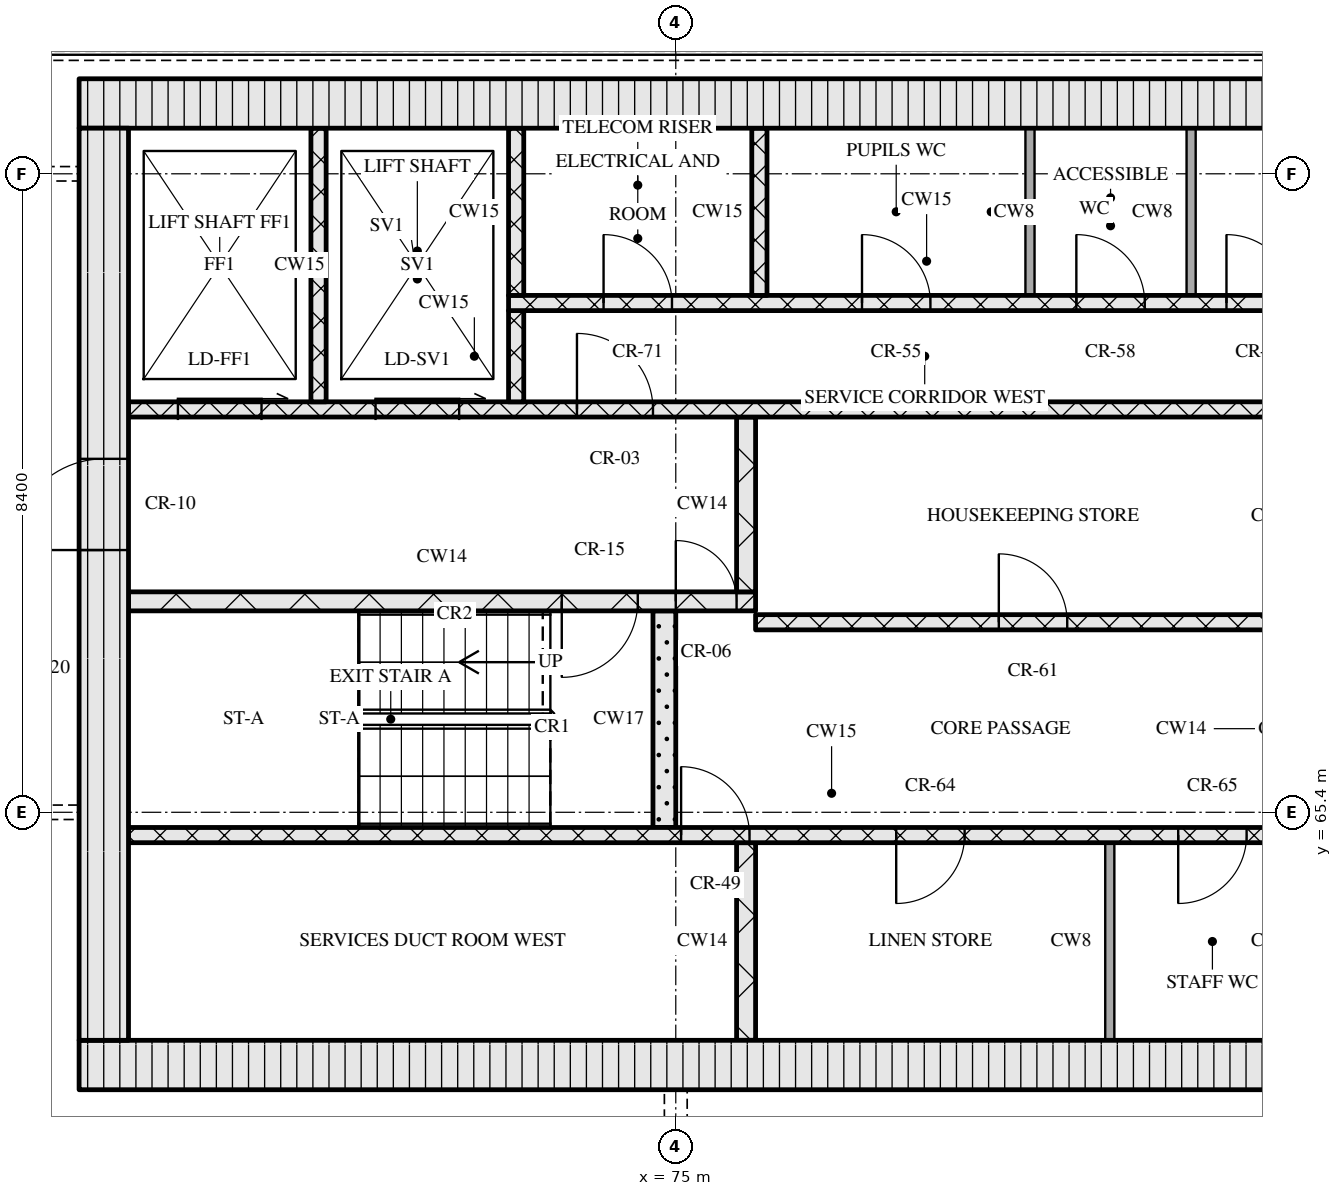
"""IFC4 building model, lengths in metres.
Left out: names, types, materials, properties, quantities, classifications, styles, units other than length and angle.
Written with IfcOpenShell. Run it as: python <this file> out.ifc"""

import sys

from ifc_helpers import new_model, si_unit, direction, frame, frame_2d, origin, place, context, subcontext, project, spatial, rectangle, extrude, element, fill, save


model = new_model("IFC4")
c1 = context("Model", 3, precision=1e-05, world=origin(), true_north=direction((0.0, 1.0)))
c2 = subcontext(c1, "Body", "Model", "MODEL_VIEW")
j1 = project(units=[si_unit("LENGTHUNIT", "METRE"), si_unit("PLANEANGLEUNIT", "RADIAN")], contexts=[c1])
p1 = place(None, origin())
s1 = spatial("IfcSite", under=j1, at=p1, CompositionType="ELEMENT")
p2 = place(p1, origin())
s2 = spatial("IfcBuilding", under=s1, at=p2, CompositionType="ELEMENT")
p3 = place(p2, frame((0.0, 0.0, 219.9)))
s3 = spatial("IfcBuildingStorey", under=s2, at=p3, CompositionType="ELEMENT", Elevation=219.9)
p4 = place(p3, frame((67.15, 62.075, 0.0), z_axis=(0.0, 0.0, 1.0), x_axis=(1.0, 0.0, 0.0)))
e1 = element("IfcWall", 1, at=p4, inside=s3, PredefinedType="SOLIDWALL", context=c2, shape_type="SweptSolid", body=[
    extrude(rectangle(XDim=40.9, YDim=0.65, at=frame_2d((20.45, 0.0))), origin(), (0.0, 0.0, 1.0), 3.32),
])
p5 = place(p4, frame((20.8, 0.0, 0.0)))
e2 = element("IfcOpeningElement", 2, at=p5, cuts=e1, PredefinedType="OPENING", context=c2, shape_type="SweptSolid", body=[
    extrude(rectangle(XDim=1.8, YDim=2.1, at=frame_2d((0.9, 1.05))), frame((0.0, 0.335, 0.0), z_axis=(0.0, -1.0, 0.0), x_axis=(1.0, 0.0, 0.0)), (0.0, 0.0, 1.0), 0.67),
])
p6 = place(p3, frame((67.15, 74.725, 0.0), z_axis=(0.0, 0.0, 1.0), x_axis=(1.0, 0.0, 0.0)))
e3 = element("IfcWall", 3, at=p6, inside=s3, PredefinedType="SOLIDWALL", context=c2, shape_type="SweptSolid", body=[
    extrude(rectangle(XDim=40.9, YDim=0.65, at=frame_2d((20.45, 0.0))), origin(), (0.0, 0.0, 1.0), 3.32),
])
p7 = place(p3, frame((67.475, 62.4, 0.0), z_axis=(0.0, 0.0, 1.0), x_axis=(0.0, 1.0, 0.0)))
e4 = element("IfcWall", 4, at=p7, inside=s3, PredefinedType="SOLIDWALL", context=c2, shape_type="SweptSolid", body=[
    extrude(rectangle(XDim=12.0, YDim=0.65, at=frame_2d((6.0, 0.0))), origin(), (0.0, 0.0, 1.0), 3.32),
])
p8 = place(p7, frame((6.45, 0.0, 0.0)))
e5 = element("IfcOpeningElement", 5, at=p8, cuts=e4, PredefinedType="OPENING", context=c2, shape_type="SweptSolid", body=[
    extrude(rectangle(XDim=1.2, YDim=2.1, at=frame_2d((0.6, 1.05))), frame((0.0, 0.335, 0.0), z_axis=(0.0, -1.0, 0.0), x_axis=(1.0, 0.0, 0.0)), (0.0, 0.0, 1.0), 0.67),
])
p9 = place(p3, frame((75.925, 62.4, 0.0), z_axis=(0.0, 0.0, 1.0), x_axis=(0.0, 1.0, 0.0)))
e6 = element("IfcWall", 6, at=p9, inside=s3, PredefinedType="SOLIDWALL", context=c2, shape_type="SweptSolid", body=[
    extrude(rectangle(XDim=2.6, YDim=0.25, at=frame_2d((1.3, 0.0))), origin(), (0.0, 0.0, 1.0), 3.32),
])
p10 = place(p3, frame((80.71, 62.4, 0.0), z_axis=(0.0, 0.0, 1.0), x_axis=(0.0, 1.0, 0.0)))
e7 = element("IfcWall", 7, at=p10, inside=s3, PredefinedType="PARTITIONING", context=c2, shape_type="SweptSolid", body=[
    extrude(rectangle(XDim=2.6, YDim=0.12, at=frame_2d((1.3, 0.0))), origin(), (0.0, 0.0, 1.0), 3.32),
])
p11 = place(p3, frame((67.8, 65.1, 0.0), z_axis=(0.0, 0.0, 1.0), x_axis=(1.0, 0.0, 0.0)))
e8 = element("IfcWall", 8, at=p11, inside=s3, PredefinedType="SOLIDWALL", context=c2, shape_type="SweptSolid", body=[
    extrude(rectangle(XDim=18.5, YDim=0.2, at=frame_2d((9.25, 0.0))), origin(), (0.0, 0.0, 1.0), 3.32),
])
p12 = place(p11, frame((7.27, 0.0, 0.0)))
e9 = element("IfcOpeningElement", 9, at=p12, cuts=e8, PredefinedType="OPENING", context=c2, shape_type="SweptSolid", body=[
    extrude(rectangle(XDim=0.9, YDim=2.1, at=frame_2d((0.45, 1.05))), frame((0.0, 0.11, 0.0), z_axis=(0.0, -1.0, 0.0), x_axis=(1.0, 0.0, 0.0)), (0.0, 0.0, 1.0), 0.22),
])
p13 = place(p11, frame((10.1, 0.0, 0.0)))
e10 = element("IfcOpeningElement", 10, at=p13, cuts=e8, PredefinedType="OPENING", context=c2, shape_type="SweptSolid", body=[
    extrude(rectangle(XDim=0.9, YDim=2.1, at=frame_2d((0.45, 1.05))), frame((0.0, 0.11, 0.0), z_axis=(0.0, -1.0, 0.0), x_axis=(1.0, 0.0, 0.0)), (0.0, 0.0, 1.0), 0.22),
])
p14 = place(p11, frame((13.81, 0.0, 0.0)))
e11 = element("IfcOpeningElement", 11, at=p14, cuts=e8, PredefinedType="OPENING", context=c2, shape_type="SweptSolid", body=[
    extrude(rectangle(XDim=0.9, YDim=2.1, at=frame_2d((0.45, 1.05))), frame((0.0, 0.11, 0.0), z_axis=(0.0, -1.0, 0.0), x_axis=(1.0, 0.0, 0.0)), (0.0, 0.0, 1.0), 0.22),
])
p15 = place(p11, frame((16.7, 0.0, 0.0)))
e12 = element("IfcOpeningElement", 12, at=p15, cuts=e8, PredefinedType="OPENING", context=c2, shape_type="SweptSolid", body=[
    extrude(rectangle(XDim=0.9, YDim=2.1, at=frame_2d((0.45, 1.05))), frame((0.0, 0.11, 0.0), z_axis=(0.0, -1.0, 0.0), x_axis=(1.0, 0.0, 0.0)), (0.0, 0.0, 1.0), 0.22),
])
p16 = place(p3, frame((74.85, 65.2, 0.0), z_axis=(0.0, 0.0, 1.0), x_axis=(0.0, 1.0, 0.0)))
e13 = element("IfcWall", 13, at=p16, inside=s3, PredefinedType="SOLIDWALL", context=c2, shape_type="SweptSolid", body=[
    extrude(rectangle(XDim=2.85, YDim=0.3, at=frame_2d((1.425, 0.0))), origin(), (0.0, 0.0, 1.0), 3.32),
])
p17 = place(p3, frame((76.05, 67.9, 0.0), z_axis=(0.0, 0.0, 1.0), x_axis=(1.0, 0.0, 0.0)))
e14 = element("IfcWall", 14, at=p17, inside=s3, PredefinedType="SOLIDWALL", context=c2, shape_type="SweptSolid", body=[
    extrude(rectangle(XDim=23.1, YDim=0.2, at=frame_2d((11.55, 0.0))), origin(), (0.0, 0.0, 1.0), 3.32),
])
p18 = place(p17, frame((3.2, 0.0, 0.0)))
e15 = element("IfcOpeningElement", 15, at=p18, cuts=e14, PredefinedType="OPENING", context=c2, shape_type="SweptSolid", body=[
    extrude(rectangle(XDim=0.9, YDim=2.1, at=frame_2d((0.45, 1.05))), frame((0.0, 0.11, 0.0), z_axis=(0.0, -1.0, 0.0), x_axis=(1.0, 0.0, 0.0)), (0.0, 0.0, 1.0), 0.22),
])
p19 = place(p17, frame((9.7, 0.0, 0.0)))
e16 = element("IfcOpeningElement", 16, at=p19, cuts=e14, PredefinedType="OPENING", context=c2, shape_type="SweptSolid", body=[
    extrude(rectangle(XDim=0.9, YDim=2.1, at=frame_2d((0.45, 1.05))), frame((0.0, 0.11, 0.0), z_axis=(0.0, -1.0, 0.0), x_axis=(1.0, 0.0, 0.0)), (0.0, 0.0, 1.0), 0.22),
])
p20 = place(p17, frame((13.55, 0.0, 0.0)))
e17 = element("IfcOpeningElement", 17, at=p20, cuts=e14, PredefinedType="OPENING", context=c2, shape_type="SweptSolid", body=[
    extrude(rectangle(XDim=1.0, YDim=2.1, at=frame_2d((0.5, 1.05))), frame((0.0, 0.11, 0.0), z_axis=(0.0, -1.0, 0.0), x_axis=(1.0, 0.0, 0.0)), (0.0, 0.0, 1.0), 0.22),
])
p21 = place(p17, frame((16.2, 0.0, 0.0)))
e18 = element("IfcOpeningElement", 18, at=p21, cuts=e14, PredefinedType="OPENING", context=c2, shape_type="SweptSolid", body=[
    extrude(rectangle(XDim=1.1, YDim=2.1, at=frame_2d((0.55, 1.05))), frame((0.0, 0.11, 0.0), z_axis=(0.0, -1.0, 0.0), x_axis=(1.0, 0.0, 0.0)), (0.0, 0.0, 1.0), 0.22),
])
p22 = place(p17, frame((18.7, 0.0, 0.0)))
e19 = element("IfcOpeningElement", 19, at=p22, cuts=e14, PredefinedType="OPENING", context=c2, shape_type="SweptSolid", body=[
    extrude(rectangle(XDim=1.1, YDim=2.1, at=frame_2d((0.55, 1.05))), frame((0.0, 0.11, 0.0), z_axis=(0.0, -1.0, 0.0), x_axis=(1.0, 0.0, 0.0)), (0.0, 0.0, 1.0), 0.22),
])
p23 = place(p17, frame((21.2, 0.0, 0.0)))
e20 = element("IfcOpeningElement", 20, at=p23, cuts=e14, PredefinedType="OPENING", context=c2, shape_type="SweptSolid", body=[
    extrude(rectangle(XDim=1.1, YDim=2.1, at=frame_2d((0.55, 1.05))), frame((0.0, 0.11, 0.0), z_axis=(0.0, -1.0, 0.0), x_axis=(1.0, 0.0, 0.0)), (0.0, 0.0, 1.0), 0.22),
])
p24 = place(p3, frame((67.8, 68.175, 0.0), z_axis=(0.0, 0.0, 1.0), x_axis=(1.0, 0.0, 0.0)))
e21 = element("IfcWall", 21, at=p24, inside=s3, PredefinedType="SOLIDWALL", context=c2, shape_type="SweptSolid", body=[
    extrude(rectangle(XDim=8.25, YDim=0.25, at=frame_2d((4.125, 0.0))), origin(), (0.0, 0.0, 1.0), 3.32),
])
p25 = place(p24, frame((5.7, 0.0, 0.0)))
e22 = element("IfcOpeningElement", 22, at=p25, cuts=e21, PredefinedType="OPENING", context=c2, shape_type="SweptSolid", body=[
    extrude(rectangle(XDim=1.0, YDim=2.1, at=frame_2d((0.5, 1.05))), frame((0.0, 0.135, 0.0), z_axis=(0.0, -1.0, 0.0), x_axis=(1.0, 0.0, 0.0)), (0.0, 0.0, 1.0), 0.27),
])
p26 = place(p24, frame((7.2, 0.0, 0.0)))
e23 = element("IfcOpeningElement", 23, at=p26, cuts=e21, PredefinedType="OPENING", context=c2, shape_type="SweptSolid", body=[
    extrude(rectangle(XDim=0.8, YDim=2.1, at=frame_2d((0.4, 1.05))), frame((0.0, 0.135, 0.0), z_axis=(0.0, -1.0, 0.0), x_axis=(1.0, 0.0, 0.0)), (0.0, 0.0, 1.0), 0.27),
])
p27 = place(p3, frame((75.925, 68.3, 0.0), z_axis=(0.0, 0.0, 1.0), x_axis=(0.0, 1.0, 0.0)))
e24 = element("IfcWall", 24, at=p27, inside=s3, PredefinedType="SOLIDWALL", context=c2, shape_type="SweptSolid", body=[
    extrude(rectangle(XDim=2.3, YDim=0.25, at=frame_2d((1.15, 0.0))), origin(), (0.0, 0.0, 1.0), 3.32),
])
p28 = place(p3, frame((67.8, 70.7, 0.0), z_axis=(0.0, 0.0, 1.0), x_axis=(1.0, 0.0, 0.0)))
e25 = element("IfcWall", 25, at=p28, inside=s3, PredefinedType="SOLIDWALL", context=c2, shape_type="SweptSolid", body=[
    extrude(rectangle(XDim=39.6, YDim=0.2, at=frame_2d((19.8, 0.0))), origin(), (0.0, 0.0, 1.0), 3.32),
])
p29 = place(p28, frame((0.65, 0.0, 0.0)))
e26 = element("IfcOpeningElement", 26, at=p29, cuts=e25, PredefinedType="OPENING", context=c2, shape_type="SweptSolid", body=[
    extrude(rectangle(XDim=1.1, YDim=2.1, at=frame_2d((0.55, 1.05))), frame((0.0, 0.11, 0.0), z_axis=(0.0, -1.0, 0.0), x_axis=(1.0, 0.0, 0.0)), (0.0, 0.0, 1.0), 0.22),
])
p30 = place(p28, frame((3.25, 0.0, 0.0)))
e27 = element("IfcOpeningElement", 27, at=p30, cuts=e25, PredefinedType="OPENING", context=c2, shape_type="SweptSolid", body=[
    extrude(rectangle(XDim=1.1, YDim=2.1, at=frame_2d((0.55, 1.05))), frame((0.0, 0.11, 0.0), z_axis=(0.0, -1.0, 0.0), x_axis=(1.0, 0.0, 0.0)), (0.0, 0.0, 1.0), 0.22),
])
p31 = place(p28, frame((5.9, 0.0, 0.0)))
e28 = element("IfcOpeningElement", 28, at=p31, cuts=e25, PredefinedType="OPENING", context=c2, shape_type="SweptSolid", body=[
    extrude(rectangle(XDim=1.0, YDim=2.1, at=frame_2d((0.5, 1.05))), frame((0.0, 0.11, 0.0), z_axis=(0.0, -1.0, 0.0), x_axis=(1.0, 0.0, 0.0)), (0.0, 0.0, 1.0), 0.22),
])
p32 = place(p28, frame((21.7, 0.0, 0.0)))
e29 = element("IfcOpeningElement", 29, at=p32, cuts=e25, PredefinedType="OPENING", context=c2, shape_type="SweptSolid", body=[
    extrude(rectangle(XDim=1.0, YDim=2.1, at=frame_2d((0.5, 1.05))), frame((0.0, 0.11, 0.0), z_axis=(0.0, -1.0, 0.0), x_axis=(1.0, 0.0, 0.0)), (0.0, 0.0, 1.0), 0.22),
])
p33 = place(p28, frame((32.7, 0.0, 0.0)))
e30 = element("IfcOpeningElement", 30, at=p33, cuts=e25, PredefinedType="OPENING", context=c2, shape_type="SweptSolid", body=[
    extrude(rectangle(XDim=1.0, YDim=2.1, at=frame_2d((0.5, 1.05))), frame((0.0, 0.11, 0.0), z_axis=(0.0, -1.0, 0.0), x_axis=(1.0, 0.0, 0.0)), (0.0, 0.0, 1.0), 0.22),
])
p34 = place(p28, frame((35.25, 0.0, 0.0)))
e31 = element("IfcOpeningElement", 31, at=p34, cuts=e25, PredefinedType="OPENING", context=c2, shape_type="SweptSolid", body=[
    extrude(rectangle(XDim=1.1, YDim=2.1, at=frame_2d((0.55, 1.05))), frame((0.0, 0.11, 0.0), z_axis=(0.0, -1.0, 0.0), x_axis=(1.0, 0.0, 0.0)), (0.0, 0.0, 1.0), 0.22),
])
p35 = place(p28, frame((37.85, 0.0, 0.0)))
e32 = element("IfcOpeningElement", 32, at=p35, cuts=e25, PredefinedType="OPENING", context=c2, shape_type="SweptSolid", body=[
    extrude(rectangle(XDim=1.1, YDim=2.1, at=frame_2d((0.55, 1.05))), frame((0.0, 0.11, 0.0), z_axis=(0.0, -1.0, 0.0), x_axis=(1.0, 0.0, 0.0)), (0.0, 0.0, 1.0), 0.22),
])
p36 = place(p3, frame((70.3, 70.8, 0.0), z_axis=(0.0, 0.0, 1.0), x_axis=(0.0, 1.0, 0.0)))
e33 = element("IfcWall", 33, at=p36, inside=s3, PredefinedType="SOLIDWALL", context=c2, shape_type="SweptSolid", body=[
    extrude(rectangle(XDim=3.6, YDim=0.2, at=frame_2d((1.8, 0.0))), origin(), (0.0, 0.0, 1.0), 3.32),
])
p37 = place(p3, frame((72.9, 70.8, 0.0), z_axis=(0.0, 0.0, 1.0), x_axis=(0.0, 1.0, 0.0)))
e34 = element("IfcWall", 34, at=p37, inside=s3, PredefinedType="SOLIDWALL", context=c2, shape_type="SweptSolid", body=[
    extrude(rectangle(XDim=1.2, YDim=0.2, at=frame_2d((0.6, 0.0))), origin(), (0.0, 0.0, 1.0), 3.32),
])
p38 = place(p3, frame((72.8, 72.1, 0.0), z_axis=(0.0, 0.0, 1.0), x_axis=(1.0, 0.0, 0.0)))
e35 = element("IfcWall", 35, at=p38, inside=s3, PredefinedType="SOLIDWALL", context=c2, shape_type="SweptSolid", body=[
    extrude(rectangle(XDim=11.0, YDim=0.2, at=frame_2d((5.5, 0.0))), origin(), (0.0, 0.0, 1.0), 3.32),
])
p39 = place(p38, frame((1.25, 0.0, 0.0)))
e36 = element("IfcOpeningElement", 36, at=p39, cuts=e35, PredefinedType="OPENING", context=c2, shape_type="SweptSolid", body=[
    extrude(rectangle(XDim=0.9, YDim=2.1, at=frame_2d((0.45, 1.05))), frame((0.0, 0.11, 0.0), z_axis=(0.0, -1.0, 0.0), x_axis=(1.0, 0.0, 0.0)), (0.0, 0.0, 1.0), 0.22),
])
p40 = place(p38, frame((4.65, 0.0, 0.0)))
e37 = element("IfcOpeningElement", 37, at=p40, cuts=e35, PredefinedType="OPENING", context=c2, shape_type="SweptSolid", body=[
    extrude(rectangle(XDim=0.9, YDim=2.1, at=frame_2d((0.45, 1.05))), frame((0.0, 0.11, 0.0), z_axis=(0.0, -1.0, 0.0), x_axis=(1.0, 0.0, 0.0)), (0.0, 0.0, 1.0), 0.22),
])
p41 = place(p38, frame((7.47, 0.0, 0.0)))
e38 = element("IfcOpeningElement", 38, at=p41, cuts=e35, PredefinedType="OPENING", context=c2, shape_type="SweptSolid", body=[
    extrude(rectangle(XDim=0.9, YDim=2.1, at=frame_2d((0.45, 1.05))), frame((0.0, 0.11, 0.0), z_axis=(0.0, -1.0, 0.0), x_axis=(1.0, 0.0, 0.0)), (0.0, 0.0, 1.0), 0.22),
])
p42 = place(p38, frame((9.445, 0.0, 0.0)))
e39 = element("IfcOpeningElement", 39, at=p42, cuts=e35, PredefinedType="OPENING", context=c2, shape_type="SweptSolid", body=[
    extrude(rectangle(XDim=0.9, YDim=2.1, at=frame_2d((0.45, 1.05))), frame((0.0, 0.11, 0.0), z_axis=(0.0, -1.0, 0.0), x_axis=(1.0, 0.0, 0.0)), (0.0, 0.0, 1.0), 0.22),
])
for number, where, z_axis, x_axis in (
    (40, (72.9, 72.2, 0.0), (0.0, 0.0, 1.0), (0.0, 1.0, 0.0)),
    (41, (76.1, 72.2, 0.0), (0.0, 0.0, 1.0), (0.0, 1.0, 0.0)),
):
    element("IfcWall", number, at=place(p3, frame(where, z_axis=z_axis, x_axis=x_axis)), inside=s3, PredefinedType="SOLIDWALL", context=c2, shape_type="SweptSolid", body=[
        extrude(rectangle(XDim=2.2, YDim=0.2, at=frame_2d((1.1, 0.0))), origin(), (0.0, 0.0, 1.0), 3.32),
    ])
for number, where, z_axis, x_axis in (
    (42, (79.66, 72.2, 0.0), (0.0, 0.0, 1.0), (0.0, 1.0, 0.0)),
    (43, (81.78, 72.2, 0.0), (0.0, 0.0, 1.0), (0.0, 1.0, 0.0)),
):
    element("IfcWall", number, at=place(p3, frame(where, z_axis=z_axis, x_axis=x_axis)), inside=s3, PredefinedType="PARTITIONING", context=c2, shape_type="SweptSolid", body=[
        extrude(rectangle(XDim=2.2, YDim=0.12, at=frame_2d((1.1, 0.0))), origin(), (0.0, 0.0, 1.0), 3.32),
    ])
p43 = place(p12, origin())
e44 = element("IfcDoor", 44, at=p43, inside=s3, OperationType="SINGLE_SWING_LEFT", PredefinedType="DOOR", context=c2, shape_type="SweptSolid", body=[
    extrude(rectangle(XDim=0.9, YDim=2.1, at=frame_2d((0.45, 1.05))), frame((0.0, 0.025, 0.0), z_axis=(0.0, -1.0, 0.0), x_axis=(1.0, 0.0, 0.0)), (0.0, 0.0, 1.0), 0.05),
])
fill(e9, e44)
p44 = place(p13, origin())
e45 = element("IfcDoor", 45, at=p44, inside=s3, OperationType="SINGLE_SWING_RIGHT", PredefinedType="DOOR", context=c2, shape_type="SweptSolid", body=[
    extrude(rectangle(XDim=0.9, YDim=2.1, at=frame_2d((0.45, 1.05))), frame((0.0, 0.025, 0.0), z_axis=(0.0, -1.0, 0.0), x_axis=(1.0, 0.0, 0.0)), (0.0, 0.0, 1.0), 0.05),
])
fill(e10, e45)
p45 = place(p14, origin())
e46 = element("IfcDoor", 46, at=p45, inside=s3, OperationType="SINGLE_SWING_RIGHT", PredefinedType="DOOR", context=c2, shape_type="SweptSolid", body=[
    extrude(rectangle(XDim=0.9, YDim=2.1, at=frame_2d((0.45, 1.05))), frame((0.0, 0.025, 0.0), z_axis=(0.0, -1.0, 0.0), x_axis=(1.0, 0.0, 0.0)), (0.0, 0.0, 1.0), 0.05),
])
fill(e11, e46)
p46 = place(p18, origin())
e47 = element("IfcDoor", 47, at=p46, inside=s3, OperationType="SINGLE_SWING_LEFT", PredefinedType="DOOR", context=c2, shape_type="SweptSolid", body=[
    extrude(rectangle(XDim=0.9, YDim=2.1, at=frame_2d((0.45, 1.05))), frame((0.0, 0.025, 0.0), z_axis=(0.0, -1.0, 0.0), x_axis=(1.0, 0.0, 0.0)), (0.0, 0.0, 1.0), 0.05),
])
fill(e15, e47)
p47 = place(p25, origin())
e48 = element("IfcDoor", 48, at=p47, inside=s3, OperationType="SINGLE_SWING_RIGHT", PredefinedType="DOOR", context=c2, shape_type="SweptSolid", body=[
    extrude(rectangle(XDim=1.0, YDim=2.1, at=frame_2d((0.5, 1.05))), frame((0.0, 0.025, 0.0), z_axis=(0.0, -1.0, 0.0), x_axis=(1.0, 0.0, 0.0)), (0.0, 0.0, 1.0), 0.05),
])
fill(e22, e48)
p48 = place(p26, origin())
e49 = element("IfcDoor", 49, at=p48, inside=s3, OperationType="SINGLE_SWING_LEFT", PredefinedType="DOOR", context=c2, shape_type="SweptSolid", body=[
    extrude(rectangle(XDim=0.8, YDim=2.1, at=frame_2d((0.4, 1.05))), frame((0.0, 0.025, 0.0), z_axis=(0.0, -1.0, 0.0), x_axis=(1.0, 0.0, 0.0)), (0.0, 0.0, 1.0), 0.05),
])
fill(e23, e49)
p49 = place(p8, origin())
e50 = element("IfcDoor", 50, at=p49, inside=s3, OperationType="SINGLE_SWING_LEFT", PredefinedType="DOOR", context=c2, shape_type="SweptSolid", body=[
    extrude(rectangle(XDim=1.2, YDim=2.1, at=frame_2d((0.6, 1.05))), frame((0.0, 0.025, 0.0), z_axis=(0.0, -1.0, 0.0), x_axis=(1.0, 0.0, 0.0)), (0.0, 0.0, 1.0), 0.05),
])
fill(e5, e50)
p50 = place(p29, origin())
e51 = element("IfcDoor", 51, at=p50, inside=s3, OperationType="SLIDING_TO_RIGHT", PredefinedType="DOOR", context=c2, shape_type="SweptSolid", body=[
    extrude(rectangle(XDim=1.1, YDim=2.1, at=frame_2d((0.55, 1.05))), frame((0.0, 0.025, 0.0), z_axis=(0.0, -1.0, 0.0), x_axis=(1.0, 0.0, 0.0)), (0.0, 0.0, 1.0), 0.05),
])
fill(e26, e51)
p51 = place(p30, origin())
e52 = element("IfcDoor", 52, at=p51, inside=s3, OperationType="SLIDING_TO_RIGHT", PredefinedType="DOOR", context=c2, shape_type="SweptSolid", body=[
    extrude(rectangle(XDim=1.1, YDim=2.1, at=frame_2d((0.55, 1.05))), frame((0.0, 0.025, 0.0), z_axis=(0.0, -1.0, 0.0), x_axis=(1.0, 0.0, 0.0)), (0.0, 0.0, 1.0), 0.05),
])
fill(e27, e52)
p52 = place(p31, origin())
e53 = element("IfcDoor", 53, at=p52, inside=s3, OperationType="SINGLE_SWING_LEFT", PredefinedType="DOOR", context=c2, shape_type="SweptSolid", body=[
    extrude(rectangle(XDim=1.0, YDim=2.1, at=frame_2d((0.5, 1.05))), frame((0.0, 0.025, 0.0), z_axis=(0.0, -1.0, 0.0), x_axis=(1.0, 0.0, 0.0)), (0.0, 0.0, 1.0), 0.05),
])
fill(e28, e53)
p53 = place(p39, origin())
e54 = element("IfcDoor", 54, at=p53, inside=s3, OperationType="SINGLE_SWING_LEFT", PredefinedType="DOOR", context=c2, shape_type="SweptSolid", body=[
    extrude(rectangle(XDim=0.9, YDim=2.1, at=frame_2d((0.45, 1.05))), frame((0.0, 0.025, 0.0), z_axis=(0.0, -1.0, 0.0), x_axis=(1.0, 0.0, 0.0)), (0.0, 0.0, 1.0), 0.05),
])
fill(e36, e54)
p54 = place(p40, origin())
e55 = element("IfcDoor", 55, at=p54, inside=s3, OperationType="SINGLE_SWING_LEFT", PredefinedType="DOOR", context=c2, shape_type="SweptSolid", body=[
    extrude(rectangle(XDim=0.9, YDim=2.1, at=frame_2d((0.45, 1.05))), frame((0.0, 0.025, 0.0), z_axis=(0.0, -1.0, 0.0), x_axis=(1.0, 0.0, 0.0)), (0.0, 0.0, 1.0), 0.05),
])
fill(e37, e55)
p55 = place(p41, origin())
e56 = element("IfcDoor", 56, at=p55, inside=s3, OperationType="SINGLE_SWING_LEFT", PredefinedType="DOOR", context=c2, shape_type="SweptSolid", body=[
    extrude(rectangle(XDim=0.9, YDim=2.1, at=frame_2d((0.45, 1.05))), frame((0.0, 0.025, 0.0), z_axis=(0.0, -1.0, 0.0), x_axis=(1.0, 0.0, 0.0)), (0.0, 0.0, 1.0), 0.05),
])
fill(e38, e56)
p56 = place(p42, origin())
e57 = element("IfcDoor", 57, at=p56, inside=s3, OperationType="SINGLE_SWING_LEFT", PredefinedType="DOOR", context=c2, shape_type="SweptSolid", body=[
    extrude(rectangle(XDim=0.9, YDim=2.1, at=frame_2d((0.45, 1.05))), frame((0.0, 0.025, 0.0), z_axis=(0.0, -1.0, 0.0), x_axis=(1.0, 0.0, 0.0)), (0.0, 0.0, 1.0), 0.05),
])
fill(e39, e57)
save(model, sys.argv[1])
